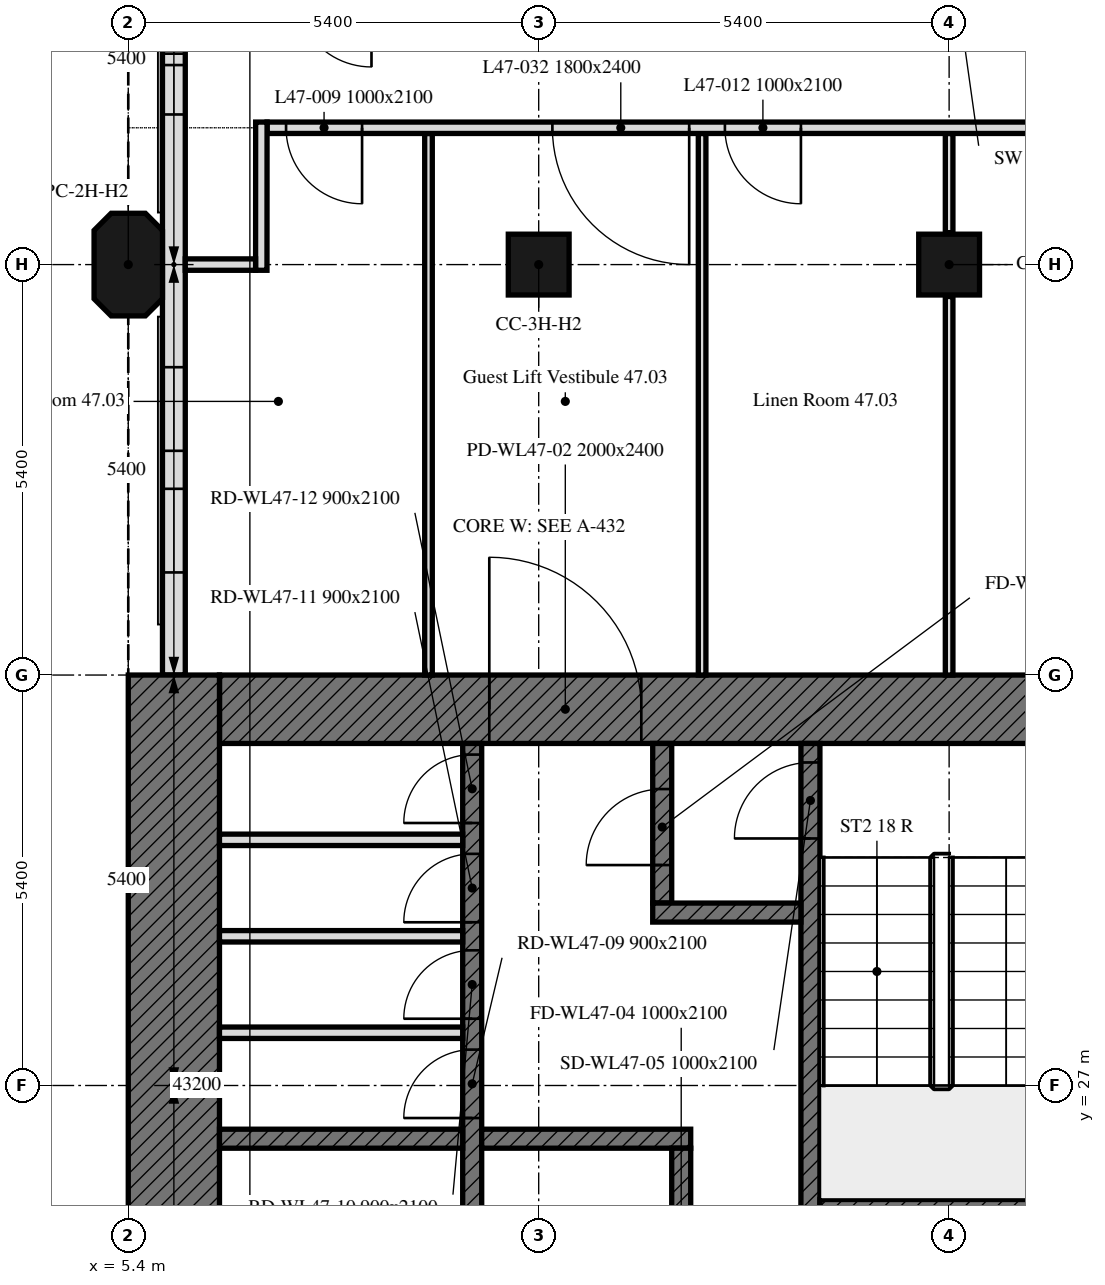
"""IFC4 building model, lengths in metres.
Left out: names, types, materials, properties, quantities, classifications, styles, units other than length and angle.
Written with IfcOpenShell. Run it as: python <this file> out.ifc"""

import sys

from ifc_helpers import new_model, si_unit, direction, frame, frame_2d, origin, origin_2d, place, context, subcontext, project, spatial, polyline, rectangle, outline, extrude, element, fill, save


model = new_model("IFC4")
c1 = context("Model", 3, precision=1e-05, world=origin(), true_north=direction((0.0, 1.0)))
c2 = subcontext(c1, "Body", "Model", "MODEL_VIEW")
j1 = project(units=[si_unit("LENGTHUNIT", "METRE"), si_unit("PLANEANGLEUNIT", "RADIAN")], contexts=[c1])
p1 = place(None, origin())
s1 = spatial("IfcSite", under=j1, at=p1, CompositionType="ELEMENT")
p2 = place(p1, origin())
s2 = spatial("IfcBuilding", under=s1, at=p2, CompositionType="ELEMENT")
p3 = place(p2, frame((0.0, 0.0, 193.9)))
s3 = spatial("IfcBuildingStorey", under=s2, at=p3, CompositionType="ELEMENT", Elevation=193.9)
p4 = place(p3, frame((5.4, 37.8, 0.0), z_axis=(0.0, 0.0, 1.0), x_axis=(0.0, 1.0, 0.0)))
e1 = element("IfcColumn", 1, at=p4, inside=s3, PredefinedType="COLUMN", context=c2, shape_type="SweptSolid", body=[
    extrude(outline(polyline([(-0.45, -0.45), (0.45, -0.45), (0.675, -0.225), (0.675, 0.225), (0.45, 0.45), (-0.45, 0.45), (-0.675, 0.225), (-0.675, -0.225), (-0.45, -0.45)])), origin(), (0.0, 0.0, 1.0), 3.0),
])
for number, where, z_axis, x_axis in (
    (2, (10.8, 37.8, 0.0), (0.0, 0.0, 1.0), (1.0, 0.0, 0.0)),
    (3, (16.2, 37.8, 0.0), (0.0, 0.0, 1.0), (1.0, 0.0, 0.0)),
):
    element("IfcColumn", number, at=place(p3, frame(where, z_axis=z_axis, x_axis=x_axis)), inside=s3, PredefinedType="COLUMN", context=c2, shape_type="SweptSolid", body=[
        extrude(rectangle(XDim=0.8, YDim=0.8, at=origin_2d()), origin(), (0.0, 0.0, 1.0), 3.0),
    ])
p5 = place(p3, frame((6.0, 43.014, 0.0), z_axis=(0.0, 0.0, 1.0), x_axis=(0.0, -1.0, 0.0)))
e4 = element("IfcWall", 4, at=p5, inside=s3, PredefinedType="SOLIDWALL", context=c2, shape_type="SweptSolid", body=[
    extrude(rectangle(XDim=10.614, YDim=0.3, at=frame_2d((5.307, 0.0))), origin(), (0.0, 0.0, 1.0), 3.0),
])
p6 = place(p5, frame((1.789, 0.0, 0.9)))
e5 = element("IfcOpeningElement", 5, at=p6, cuts=e4, PredefinedType="OPENING", context=c2, shape_type="SweptSolid", body=[
    extrude(rectangle(XDim=0.65, YDim=1.7, at=frame_2d((0.325, 0.85))), frame((0.0, 0.16, 0.0), z_axis=(0.0, -1.0, 0.0), x_axis=(1.0, 0.0, 0.0)), (0.0, 0.0, 1.0), 0.32),
])
p7 = place(p5, frame((2.589, 0.0, 0.9)))
e6 = element("IfcOpeningElement", 6, at=p7, cuts=e4, PredefinedType="OPENING", context=c2, shape_type="SweptSolid", body=[
    extrude(rectangle(XDim=0.65, YDim=1.7, at=frame_2d((0.325, 0.85))), frame((0.0, 0.16, 0.0), z_axis=(0.0, -1.0, 0.0), x_axis=(1.0, 0.0, 0.0)), (0.0, 0.0, 1.0), 0.32),
])
p8 = place(p5, frame((6.564, 0.0, 0.9)))
e7 = element("IfcOpeningElement", 7, at=p8, cuts=e4, PredefinedType="OPENING", context=c2, shape_type="SweptSolid", body=[
    extrude(rectangle(XDim=1.1, YDim=1.7, at=frame_2d((0.55, 0.85))), frame((0.0, 0.16, 0.0), z_axis=(0.0, -1.0, 0.0), x_axis=(1.0, 0.0, 0.0)), (0.0, 0.0, 1.0), 0.32),
])
p9 = place(p5, frame((8.164, 0.0, 0.9)))
e8 = element("IfcOpeningElement", 8, at=p9, cuts=e4, PredefinedType="OPENING", context=c2, shape_type="SweptSolid", body=[
    extrude(rectangle(XDim=1.1, YDim=1.7, at=frame_2d((0.55, 0.85))), frame((0.0, 0.16, 0.0), z_axis=(0.0, -1.0, 0.0), x_axis=(1.0, 0.0, 0.0)), (0.0, 0.0, 1.0), 0.32),
])
p10 = place(p3, frame((6.6, 31.95, 0.0), z_axis=(0.0, 0.0, 1.0), x_axis=(1.0, 0.0, 0.0)))
e9 = element("IfcWall", 9, at=p10, inside=s3, PredefinedType="SOLIDWALL", context=c2, shape_type="SweptSolid", body=[
    extrude(rectangle(XDim=11.1, YDim=0.9, at=frame_2d((5.55, 0.0))), origin(), (0.0, 0.0, 1.0), 3.0),
])
p11 = place(p10, frame((3.55, 0.0, 0.0)))
e10 = element("IfcOpeningElement", 10, at=p11, cuts=e9, PredefinedType="OPENING", context=c2, shape_type="SweptSolid", body=[
    extrude(rectangle(XDim=2.0, YDim=2.4, at=frame_2d((1.0, 1.2))), frame((0.0, 0.45, 0.0), z_axis=(0.0, -1.0, 0.0), x_axis=(1.0, 0.0, 0.0)), (0.0, 0.0, 1.0), 0.9),
])
p12 = place(p3, frame((6.0, 16.2, 0.0), z_axis=(0.0, 0.0, 1.0), x_axis=(0.0, 1.0, 0.0)))
e11 = element("IfcWall", 11, at=p12, inside=s3, PredefinedType="SOLIDWALL", context=c2, shape_type="SweptSolid", body=[
    extrude(rectangle(XDim=16.2, YDim=1.2, at=frame_2d((8.1, 0.0))), origin(), (0.0, 0.0, 1.0), 3.0),
])
p13 = place(p3, frame((9.925, 17.1, 0.0), z_axis=(0.0, 0.0, 1.0), x_axis=(0.0, 1.0, 0.0)))
e12 = element("IfcWall", 12, at=p13, inside=s3, PredefinedType="SOLIDWALL", context=c2, shape_type="SweptSolid", body=[
    extrude(rectangle(XDim=14.4, YDim=0.25, at=frame_2d((7.2, 0.0))), origin(), (0.0, 0.0, 1.0), 3.0),
])
p14 = place(p13, frame((4.6, 0.0, 0.0)))
e13 = element("IfcOpeningElement", 13, at=p14, cuts=e12, PredefinedType="OPENING", context=c2, shape_type="SweptSolid", body=[
    extrude(rectangle(XDim=1.0, YDim=2.1, at=frame_2d((0.5, 1.05))), frame((0.0, 0.125, 0.0), z_axis=(0.0, -1.0, 0.0), x_axis=(1.0, 0.0, 0.0)), (0.0, 0.0, 1.0), 0.25),
])
p15 = place(p13, frame((7.062, 0.0, 0.0)))
e14 = element("IfcOpeningElement", 14, at=p15, cuts=e12, PredefinedType="OPENING", context=c2, shape_type="SweptSolid", body=[
    extrude(rectangle(XDim=1.2, YDim=2.1, at=frame_2d((0.6, 1.05))), frame((0.0, 0.125, 0.0), z_axis=(0.0, -1.0, 0.0), x_axis=(1.0, 0.0, 0.0)), (0.0, 0.0, 1.0), 0.25),
])
p16 = place(p13, frame((9.472, 0.0, 0.0)))
e15 = element("IfcOpeningElement", 15, at=p16, cuts=e12, PredefinedType="OPENING", context=c2, shape_type="SweptSolid", body=[
    extrude(rectangle(XDim=0.9, YDim=2.1, at=frame_2d((0.45, 1.05))), frame((0.0, 0.125, 0.0), z_axis=(0.0, -1.0, 0.0), x_axis=(1.0, 0.0, 0.0)), (0.0, 0.0, 1.0), 0.25),
])
p17 = place(p13, frame((10.779, 0.0, 0.0)))
e16 = element("IfcOpeningElement", 16, at=p17, cuts=e12, PredefinedType="OPENING", context=c2, shape_type="SweptSolid", body=[
    extrude(rectangle(XDim=0.9, YDim=2.1, at=frame_2d((0.45, 1.05))), frame((0.0, 0.125, 0.0), z_axis=(0.0, -1.0, 0.0), x_axis=(1.0, 0.0, 0.0)), (0.0, 0.0, 1.0), 0.25),
])
p18 = place(p13, frame((12.048, 0.0, 0.0)))
e17 = element("IfcOpeningElement", 17, at=p18, cuts=e12, PredefinedType="OPENING", context=c2, shape_type="SweptSolid", body=[
    extrude(rectangle(XDim=0.9, YDim=2.1, at=frame_2d((0.45, 1.05))), frame((0.0, 0.125, 0.0), z_axis=(0.0, -1.0, 0.0), x_axis=(1.0, 0.0, 0.0)), (0.0, 0.0, 1.0), 0.25),
])
p19 = place(p13, frame((13.354, 0.0, 0.0)))
e18 = element("IfcOpeningElement", 18, at=p19, cuts=e12, PredefinedType="OPENING", context=c2, shape_type="SweptSolid", body=[
    extrude(rectangle(XDim=0.9, YDim=2.1, at=frame_2d((0.45, 1.05))), frame((0.0, 0.125, 0.0), z_axis=(0.0, -1.0, 0.0), x_axis=(1.0, 0.0, 0.0)), (0.0, 0.0, 1.0), 0.25),
])
p20 = place(p3, frame((14.375, 17.1, 0.0), z_axis=(0.0, 0.0, 1.0), x_axis=(0.0, 1.0, 0.0)))
e19 = element("IfcWall", 19, at=p20, inside=s3, PredefinedType="SOLIDWALL", context=c2, shape_type="SweptSolid", body=[
    extrude(rectangle(XDim=14.4, YDim=0.25, at=frame_2d((7.2, 0.0))), origin(), (0.0, 0.0, 1.0), 3.0),
])
p21 = place(p20, frame((13.15, 0.0, 0.0)))
e20 = element("IfcOpeningElement", 20, at=p21, cuts=e19, PredefinedType="OPENING", context=c2, shape_type="SweptSolid", body=[
    extrude(rectangle(XDim=1.0, YDim=2.1, at=frame_2d((0.5, 1.05))), frame((0.0, 0.125, 0.0), z_axis=(0.0, -1.0, 0.0), x_axis=(1.0, 0.0, 0.0)), (0.0, 0.0, 1.0), 0.25),
])
p22 = place(p20, frame((0.6, 0.0, 0.0)))
e21 = element("IfcOpeningElement", 21, at=p22, cuts=e19, PredefinedType="OPENING", context=c2, shape_type="SweptSolid", body=[
    extrude(rectangle(XDim=1.1, YDim=2.1, at=frame_2d((0.55, 1.05))), frame((0.0, 0.125, 0.0), z_axis=(0.0, -1.0, 0.0), x_axis=(1.0, 0.0, 0.0)), (0.0, 0.0, 1.0), 0.25),
])
p23 = place(p20, frame((3.25, 0.0, 0.0)))
e22 = element("IfcOpeningElement", 22, at=p23, cuts=e19, PredefinedType="OPENING", context=c2, shape_type="SweptSolid", body=[
    extrude(rectangle(XDim=0.9, YDim=2.1, at=frame_2d((0.45, 1.05))), frame((0.0, 0.125, 0.0), z_axis=(0.0, -1.0, 0.0), x_axis=(1.0, 0.0, 0.0)), (0.0, 0.0, 1.0), 0.25),
])
for number, where, z_axis, x_axis in (
    (23, (14.5, 25.375, 0.0), (0.0, 0.0, 1.0), (1.0, 0.0, 0.0)),
    (24, (6.6, 26.3, 0.0), (0.0, 0.0, 1.0), (1.0, 0.0, 0.0)),
):
    element("IfcWall", number, at=place(p3, frame(where, z_axis=z_axis, x_axis=x_axis)), inside=s3, PredefinedType="SOLIDWALL", context=c2, shape_type="SweptSolid", body=[
        extrude(rectangle(XDim=3.2, YDim=0.25, at=frame_2d((1.6, 0.0))), origin(), (0.0, 0.0, 1.0), 3.0),
    ])
p24 = place(p3, frame((10.05, 26.3, 0.0), z_axis=(0.0, 0.0, 1.0), x_axis=(1.0, 0.0, 0.0)))
e25 = element("IfcWall", 25, at=p24, inside=s3, PredefinedType="SOLIDWALL", context=c2, shape_type="SweptSolid", body=[
    extrude(rectangle(XDim=2.75, YDim=0.25, at=frame_2d((1.375, 0.0))), origin(), (0.0, 0.0, 1.0), 3.0),
])
p25 = place(p3, frame((12.425, 29.4, 0.0), z_axis=(0.0, 0.0, 1.0), x_axis=(0.0, 1.0, 0.0)))
e26 = element("IfcWall", 26, at=p25, inside=s3, PredefinedType="SOLIDWALL", context=c2, shape_type="SweptSolid", body=[
    extrude(rectangle(XDim=2.1, YDim=0.25, at=frame_2d((1.05, 0.0))), origin(), (0.0, 0.0, 1.0), 3.0),
])
p26 = place(p25, frame((0.5, 0.0, 0.0)))
e27 = element("IfcOpeningElement", 27, at=p26, cuts=e26, PredefinedType="OPENING", context=c2, shape_type="SweptSolid", body=[
    extrude(rectangle(XDim=1.0, YDim=2.1, at=frame_2d((0.5, 1.05))), frame((0.0, 0.125, 0.0), z_axis=(0.0, -1.0, 0.0), x_axis=(1.0, 0.0, 0.0)), (0.0, 0.0, 1.0), 0.25),
])
p27 = place(p3, frame((12.3, 29.275, 0.0), z_axis=(0.0, 0.0, 1.0), x_axis=(1.0, 0.0, 0.0)))
e28 = element("IfcWall", 28, at=p27, inside=s3, PredefinedType="SOLIDWALL", context=c2, shape_type="SweptSolid", body=[
    extrude(rectangle(XDim=1.95, YDim=0.25, at=frame_2d((0.975, 0.0))), origin(), (0.0, 0.0, 1.0), 3.0),
])
p28 = place(p3, frame((12.675, 20.55, 0.0), z_axis=(0.0, 0.0, 1.0), x_axis=(0.0, 1.0, 0.0)))
e29 = element("IfcWall", 29, at=p28, inside=s3, PredefinedType="SOLIDWALL", context=c2, shape_type="SweptSolid", body=[
    extrude(rectangle(XDim=5.625, YDim=0.25, at=frame_2d((2.812, 0.0))), origin(), (0.0, 0.0, 1.0), 3.0),
])
p29 = place(p28, frame((2.95, 0.0, 0.0)))
e30 = element("IfcOpeningElement", 30, at=p29, cuts=e29, PredefinedType="OPENING", context=c2, shape_type="SweptSolid", body=[
    extrude(rectangle(XDim=1.0, YDim=2.1, at=frame_2d((0.5, 1.05))), frame((0.0, 0.125, 0.0), z_axis=(0.0, -1.0, 0.0), x_axis=(1.0, 0.0, 0.0)), (0.0, 0.0, 1.0), 0.25),
])
for number, where, z_axis, x_axis in (
    (31, (6.6, 27.694, 0.0), (0.0, 0.0, 1.0), (1.0, 0.0, 0.0)),
    (32, (6.6, 28.963, 0.0), (0.0, 0.0, 1.0), (1.0, 0.0, 0.0)),
    (33, (6.6, 30.232, 0.0), (0.0, 0.0, 1.0), (1.0, 0.0, 0.0)),
):
    element("IfcWall", number, at=place(p3, frame(where, z_axis=z_axis, x_axis=x_axis)), inside=s3, PredefinedType="PARTITIONING", context=c2, shape_type="SweptSolid", body=[
        extrude(rectangle(XDim=3.2, YDim=0.15, at=frame_2d((1.6, 0.0))), origin(), (0.0, 0.0, 1.0), 3.0),
    ])
p30 = place(p3, frame((16.2, 39.525, 0.0), z_axis=(0.0, 0.0, 1.0), x_axis=(0.0, -1.0, 0.0)))
e34 = element("IfcWall", 34, at=p30, inside=s3, PredefinedType="PARTITIONING", context=c2, shape_type="SweptSolid", body=[
    extrude(rectangle(XDim=1.305, YDim=0.1, at=frame_2d((0.652, 0.0))), origin(), (0.0, 0.0, 1.0), 2.4),
])
p31 = place(p3, frame((16.2, 37.38, 0.0), z_axis=(0.0, 0.0, 1.0), x_axis=(0.0, -1.0, 0.0)))
e35 = element("IfcWall", 35, at=p31, inside=s3, PredefinedType="PARTITIONING", context=c2, shape_type="SweptSolid", body=[
    extrude(rectangle(XDim=4.98, YDim=0.1, at=frame_2d((2.49, 0.0))), origin(), (0.0, 0.0, 1.0), 2.4),
])
for number, where, z_axis, x_axis in (
    (36, (9.35, 39.525, 0.0), (0.0, 0.0, 1.0), (0.0, -1.0, 0.0)),
    (37, (12.95, 32.4, 0.0), (0.0, 0.0, 1.0), (0.0, 1.0, 0.0)),
):
    element("IfcWall", number, at=place(p3, frame(where, z_axis=z_axis, x_axis=x_axis)), inside=s3, PredefinedType="PARTITIONING", context=c2, shape_type="SweptSolid", body=[
        extrude(rectangle(XDim=7.125, YDim=0.1, at=frame_2d((3.562, 0.0))), origin(), (0.0, 0.0, 1.0), 3.0),
    ])
p32 = place(p3, frame((43.275, 39.6, 0.0), z_axis=(0.0, 0.0, 1.0), x_axis=(-1.0, 0.0, 0.0)))
e38 = element("IfcWall", 38, at=p32, inside=s3, PredefinedType="PARTITIONING", context=c2, shape_type="SweptSolid", body=[
    extrude(rectangle(XDim=36.049, YDim=0.15, at=frame_2d((18.024, 0.0))), origin(), (0.0, 0.0, 1.0), 2.4),
])
p33 = place(p32, frame((18.475, 0.0, 0.0)))
e39 = element("IfcOpeningElement", 39, at=p33, cuts=e38, PredefinedType="OPENING", context=c2, shape_type="SweptSolid", body=[
    extrude(rectangle(XDim=1.0, YDim=2.1, at=frame_2d((0.5, 1.05))), frame((0.0, 0.075, 0.0), z_axis=(0.0, -1.0, 0.0), x_axis=(1.0, 0.0, 0.0)), (0.0, 0.0, 1.0), 0.15),
])
p34 = place(p32, frame((34.799, 0.0, 0.0)))
e40 = element("IfcOpeningElement", 40, at=p34, cuts=e38, PredefinedType="OPENING", context=c2, shape_type="SweptSolid", body=[
    extrude(rectangle(XDim=1.0, YDim=2.1, at=frame_2d((0.5, 1.05))), frame((0.0, 0.075, 0.0), z_axis=(0.0, -1.0, 0.0), x_axis=(1.0, 0.0, 0.0)), (0.0, 0.0, 1.0), 0.15),
])
p35 = place(p32, frame((7.925, 0.0, 0.0)))
e41 = element("IfcOpeningElement", 41, at=p35, cuts=e38, PredefinedType="OPENING", context=c2, shape_type="SweptSolid", body=[
    extrude(rectangle(XDim=1.0, YDim=2.1, at=frame_2d((0.5, 1.05))), frame((0.0, 0.075, 0.0), z_axis=(0.0, -1.0, 0.0), x_axis=(1.0, 0.0, 0.0)), (0.0, 0.0, 1.0), 0.15),
])
p36 = place(p32, frame((29.025, 0.0, 0.0)))
e42 = element("IfcOpeningElement", 42, at=p36, cuts=e38, PredefinedType="OPENING", context=c2, shape_type="SweptSolid", body=[
    extrude(rectangle(XDim=1.0, YDim=2.1, at=frame_2d((0.5, 1.05))), frame((0.0, 0.075, 0.0), z_axis=(0.0, -1.0, 0.0), x_axis=(1.0, 0.0, 0.0)), (0.0, 0.0, 1.0), 0.15),
])
p37 = place(p32, frame((30.495, 0.0, 0.0)))
e43 = element("IfcOpeningElement", 43, at=p37, cuts=e38, PredefinedType="OPENING", context=c2, shape_type="SweptSolid", body=[
    extrude(rectangle(XDim=1.8, YDim=2.4, at=frame_2d((0.9, 1.2))), frame((0.0, 0.075, 0.0), z_axis=(0.0, -1.0, 0.0), x_axis=(1.0, 0.0, 0.0)), (0.0, 0.0, 1.0), 0.15),
])
p38 = place(p32, frame((5.925, 0.0, 0.0)))
e44 = element("IfcOpeningElement", 44, at=p38, cuts=e38, PredefinedType="OPENING", context=c2, shape_type="SweptSolid", body=[
    extrude(rectangle(XDim=1.0, YDim=2.1, at=frame_2d((0.5, 1.05))), frame((0.0, 0.075, 0.0), z_axis=(0.0, -1.0, 0.0), x_axis=(1.0, 0.0, 0.0)), (0.0, 0.0, 1.0), 0.15),
])
p39 = place(p3, frame((7.151, 39.675, 0.0), z_axis=(0.0, 0.0, 1.0), x_axis=(-0.00050081376, -0.999999874593, 0.0)))
e45 = element("IfcWall", 45, at=p39, inside=s3, PredefinedType="PARTITIONING", context=c2, shape_type="SweptSolid", body=[
    extrude(rectangle(XDim=1.95, YDim=0.15, at=frame_2d((0.975, 0.0))), origin(), (0.0, 0.0, 1.0), 3.0),
])
p40 = place(p3, frame((7.075, 37.8, 0.0), z_axis=(0.0, 0.0, 1.0), x_axis=(-1.0, 0.0, 0.0)))
e46 = element("IfcWall", 46, at=p40, inside=s3, PredefinedType="PARTITIONING", context=c2, shape_type="SweptSolid", body=[
    extrude(rectangle(XDim=0.925, YDim=0.15, at=frame_2d((0.462, 0.0))), origin(), (0.0, 0.0, 1.0), 3.0),
])
p41 = place(p6, origin())
e47 = element("IfcWindow", 47, at=p41, inside=s3, PartitioningType="SINGLE_PANEL", PredefinedType="WINDOW", context=c2, shape_type="SweptSolid", body=[
    extrude(rectangle(XDim=0.65, YDim=1.7, at=frame_2d((0.325, 0.85))), frame((0.0, 0.03, 0.0), z_axis=(0.0, -1.0, 0.0), x_axis=(1.0, 0.0, 0.0)), (0.0, 0.0, 1.0), 0.06),
])
fill(e5, e47)
p42 = place(p7, origin())
e48 = element("IfcWindow", 48, at=p42, inside=s3, PartitioningType="SINGLE_PANEL", PredefinedType="WINDOW", context=c2, shape_type="SweptSolid", body=[
    extrude(rectangle(XDim=0.65, YDim=1.7, at=frame_2d((0.325, 0.85))), frame((0.0, 0.03, 0.0), z_axis=(0.0, -1.0, 0.0), x_axis=(1.0, 0.0, 0.0)), (0.0, 0.0, 1.0), 0.06),
])
fill(e6, e48)
p43 = place(p8, origin())
e49 = element("IfcWindow", 49, at=p43, inside=s3, PartitioningType="SINGLE_PANEL", PredefinedType="WINDOW", context=c2, shape_type="SweptSolid", body=[
    extrude(rectangle(XDim=1.1, YDim=1.7, at=frame_2d((0.55, 0.85))), frame((0.0, 0.03, 0.0), z_axis=(0.0, -1.0, 0.0), x_axis=(1.0, 0.0, 0.0)), (0.0, 0.0, 1.0), 0.06),
])
fill(e7, e49)
p44 = place(p9, origin())
e50 = element("IfcWindow", 50, at=p44, inside=s3, PartitioningType="SINGLE_PANEL", PredefinedType="WINDOW", context=c2, shape_type="SweptSolid", body=[
    extrude(rectangle(XDim=1.1, YDim=1.7, at=frame_2d((0.55, 0.85))), frame((0.0, 0.03, 0.0), z_axis=(0.0, -1.0, 0.0), x_axis=(1.0, 0.0, 0.0)), (0.0, 0.0, 1.0), 0.06),
])
fill(e8, e50)
p45 = place(p11, origin())
e51 = element("IfcDoor", 51, at=p45, inside=s3, OperationType="DOUBLE_DOOR_SINGLE_SWING", PredefinedType="DOOR", context=c2, shape_type="SweptSolid", body=[
    extrude(rectangle(XDim=2.0, YDim=2.4, at=frame_2d((1.0, 1.2))), frame((0.0, 0.025, 0.0), z_axis=(0.0, -1.0, 0.0), x_axis=(1.0, 0.0, 0.0)), (0.0, 0.0, 1.0), 0.05),
])
fill(e10, e51)
p46 = place(p21, origin())
e52 = element("IfcDoor", 52, at=p46, inside=s3, OperationType="SINGLE_SWING_LEFT", PredefinedType="DOOR", context=c2, shape_type="SweptSolid", body=[
    extrude(rectangle(XDim=1.0, YDim=2.1, at=frame_2d((0.5, 1.05))), frame((0.0, 0.025, 0.0), z_axis=(0.0, -1.0, 0.0), x_axis=(1.0, 0.0, 0.0)), (0.0, 0.0, 1.0), 0.05),
])
fill(e20, e52)
p47 = place(p26, origin())
e53 = element("IfcDoor", 53, at=p47, inside=s3, OperationType="SINGLE_SWING_LEFT", PredefinedType="DOOR", context=c2, shape_type="SweptSolid", body=[
    extrude(rectangle(XDim=1.0, YDim=2.1, at=frame_2d((0.5, 1.05))), frame((0.0, 0.025, 0.0), z_axis=(0.0, -1.0, 0.0), x_axis=(1.0, 0.0, 0.0)), (0.0, 0.0, 1.0), 0.05),
])
fill(e27, e53)
p48 = place(p16, origin())
e54 = element("IfcDoor", 54, at=p48, inside=s3, OperationType="SINGLE_SWING_LEFT", PredefinedType="DOOR", context=c2, shape_type="SweptSolid", body=[
    extrude(rectangle(XDim=0.9, YDim=2.1, at=frame_2d((0.45, 1.05))), frame((0.0, 0.025, 0.0), z_axis=(0.0, -1.0, 0.0), x_axis=(1.0, 0.0, 0.0)), (0.0, 0.0, 1.0), 0.05),
])
fill(e15, e54)
p49 = place(p17, origin())
e55 = element("IfcDoor", 55, at=p49, inside=s3, OperationType="SINGLE_SWING_LEFT", PredefinedType="DOOR", context=c2, shape_type="SweptSolid", body=[
    extrude(rectangle(XDim=0.9, YDim=2.1, at=frame_2d((0.45, 1.05))), frame((0.0, 0.025, 0.0), z_axis=(0.0, -1.0, 0.0), x_axis=(1.0, 0.0, 0.0)), (0.0, 0.0, 1.0), 0.05),
])
fill(e16, e55)
p50 = place(p18, origin())
e56 = element("IfcDoor", 56, at=p50, inside=s3, OperationType="SINGLE_SWING_LEFT", PredefinedType="DOOR", context=c2, shape_type="SweptSolid", body=[
    extrude(rectangle(XDim=0.9, YDim=2.1, at=frame_2d((0.45, 1.05))), frame((0.0, 0.025, 0.0), z_axis=(0.0, -1.0, 0.0), x_axis=(1.0, 0.0, 0.0)), (0.0, 0.0, 1.0), 0.05),
])
fill(e17, e56)
p51 = place(p19, origin())
e57 = element("IfcDoor", 57, at=p51, inside=s3, OperationType="SINGLE_SWING_LEFT", PredefinedType="DOOR", context=c2, shape_type="SweptSolid", body=[
    extrude(rectangle(XDim=0.9, YDim=2.1, at=frame_2d((0.45, 1.05))), frame((0.0, 0.025, 0.0), z_axis=(0.0, -1.0, 0.0), x_axis=(1.0, 0.0, 0.0)), (0.0, 0.0, 1.0), 0.05),
])
fill(e18, e57)
p52 = place(p34, origin())
e58 = element("IfcDoor", 58, at=p52, inside=s3, OperationType="SINGLE_SWING_RIGHT", PredefinedType="DOOR", context=c2, shape_type="SweptSolid", body=[
    extrude(rectangle(XDim=1.0, YDim=2.1, at=frame_2d((0.5, 1.05))), frame((0.0, 0.025, 0.0), z_axis=(0.0, -1.0, 0.0), x_axis=(1.0, 0.0, 0.0)), (0.0, 0.0, 1.0), 0.05),
])
fill(e40, e58)
p53 = place(p36, origin())
e59 = element("IfcDoor", 59, at=p53, inside=s3, OperationType="SINGLE_SWING_LEFT", PredefinedType="DOOR", context=c2, shape_type="SweptSolid", body=[
    extrude(rectangle(XDim=1.0, YDim=2.1, at=frame_2d((0.5, 1.05))), frame((0.0, 0.025, 0.0), z_axis=(0.0, -1.0, 0.0), x_axis=(1.0, 0.0, 0.0)), (0.0, 0.0, 1.0), 0.05),
])
fill(e42, e59)
p54 = place(p37, origin())
e60 = element("IfcDoor", 60, at=p54, inside=s3, OperationType="DOUBLE_DOOR_SINGLE_SWING", PredefinedType="DOOR", context=c2, shape_type="SweptSolid", body=[
    extrude(rectangle(XDim=1.8, YDim=2.4, at=frame_2d((0.9, 1.2))), frame((0.0, 0.025, 0.0), z_axis=(0.0, -1.0, 0.0), x_axis=(1.0, 0.0, 0.0)), (0.0, 0.0, 1.0), 0.05),
])
fill(e43, e60)
save(model, sys.argv[1])
